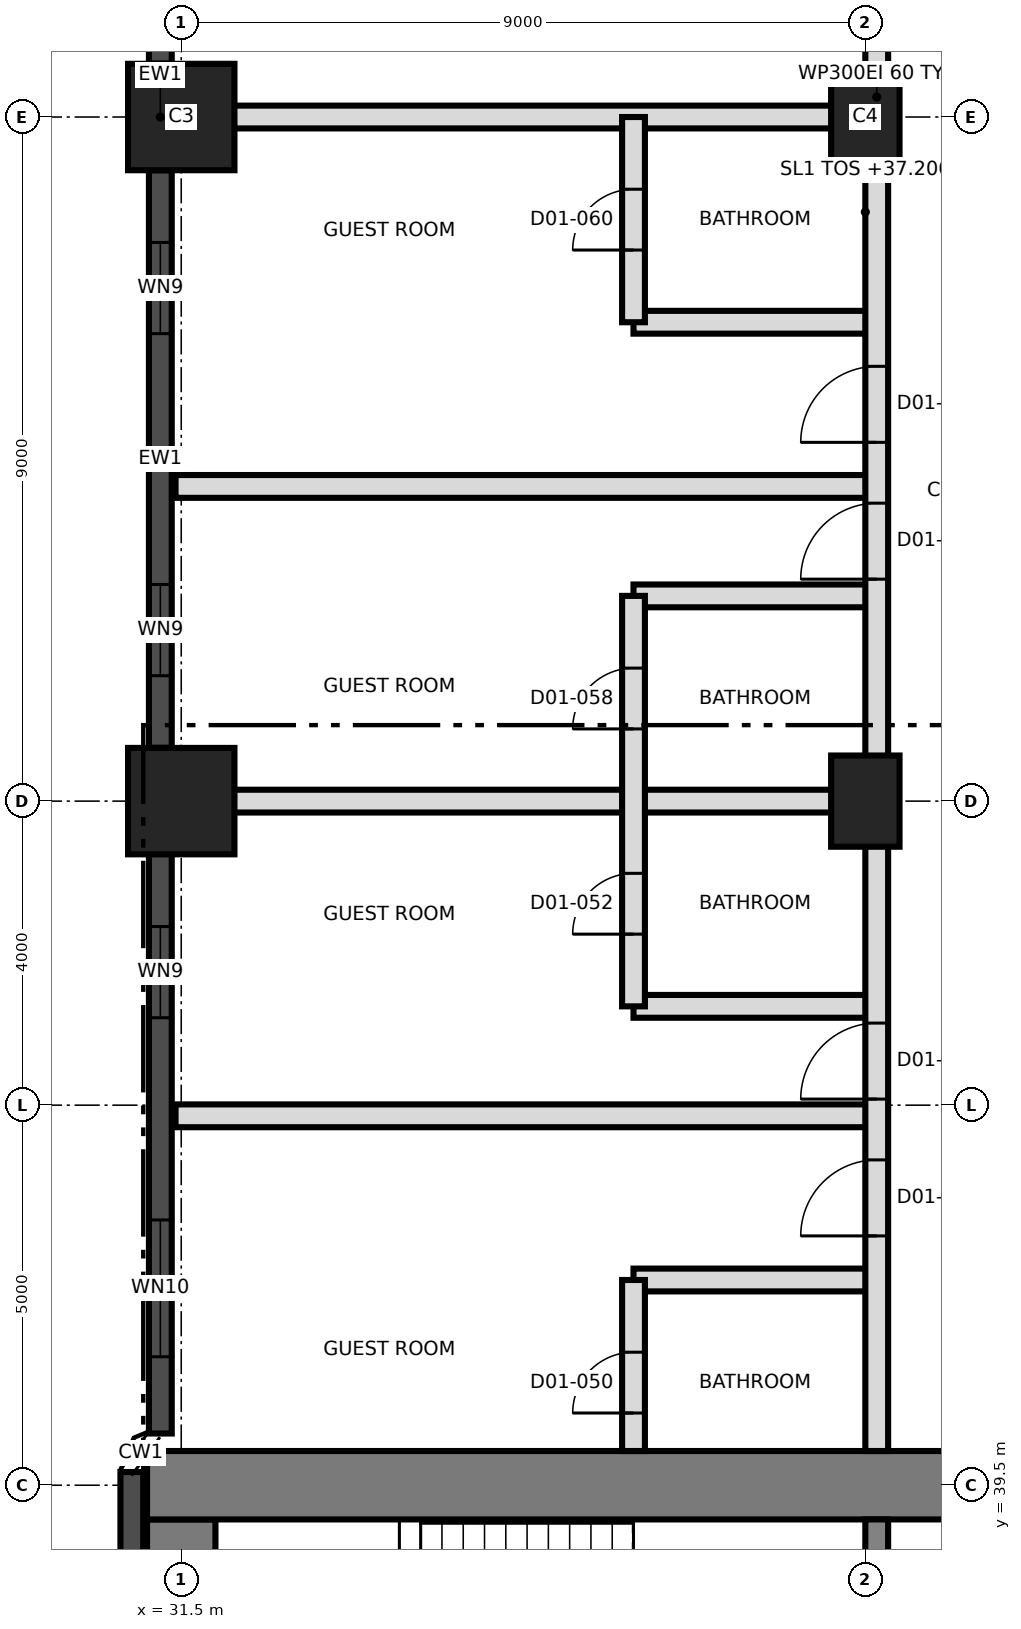
"""IFC4 building model, lengths in metres.
Left out: names, types, materials, properties, quantities, classifications, styles, units other than length and angle.
Written with IfcOpenShell. Run it as: python <this file> out.ifc"""

import sys

from ifc_helpers import new_model, si_unit, direction, frame, frame_2d, origin, origin_2d, place, context, subcontext, project, spatial, rectangle, extrude, element, fill, save


model = new_model("IFC4")
c1 = context("Model", 3, precision=1e-05, world=origin(), true_north=direction((0.0, 1.0)))
c2 = subcontext(c1, "Body", "Model", "MODEL_VIEW")
j1 = project(units=[si_unit("LENGTHUNIT", "METRE"), si_unit("PLANEANGLEUNIT", "RADIAN")], contexts=[c1])
p1 = place(None, origin())
s1 = spatial("IfcSite", under=j1, at=p1, CompositionType="ELEMENT")
p2 = place(p1, origin())
s2 = spatial("IfcBuilding", under=s1, at=p2, CompositionType="ELEMENT")
p3 = place(p2, frame((0.0, 0.0, 37.2)))
s3 = spatial("IfcBuildingStorey", under=s2, at=p3, CompositionType="ELEMENT", Elevation=37.2)
p4 = place(p3, frame((31.5, 21.95, 0.0), z_axis=(0.0, 0.0, 1.0), x_axis=(0.0, 1.0, 0.0)))
e1 = element("IfcWall", 1, at=p4, inside=s3, PredefinedType="SHEAR", context=c2, shape_type="SweptSolid", body=[
    extrude(rectangle(XDim=17.1, YDim=0.9, at=frame_2d((8.55, 0.0))), origin(), (0.0, 0.0, 1.0), 3.7),
])
p5 = place(p3, frame((31.05, 39.5, 0.0), z_axis=(0.0, 0.0, 1.0), x_axis=(1.0, 0.0, 0.0)))
e2 = element("IfcWall", 2, at=p5, inside=s3, PredefinedType="SHEAR", context=c2, shape_type="SweptSolid", body=[
    extrude(rectangle(XDim=27.0, YDim=0.9, at=frame_2d((13.5, 0.0))), origin(), (0.0, 0.0, 1.0), 3.7),
])
p6 = place(p5, frame((10.65, 0.0, 0.0)))
e3 = element("IfcOpeningElement", 3, at=p6, cuts=e2, PredefinedType="OPENING", context=c2, shape_type="SweptSolid", body=[
    extrude(rectangle(XDim=1.2, YDim=2.1, at=frame_2d((0.6, 1.05))), frame((0.0, 0.46, 0.0), z_axis=(0.0, -1.0, 0.0), x_axis=(1.0, 0.0, 0.0)), (0.0, 0.0, 1.0), 0.92),
])
p7 = place(p3, frame((40.65, 33.5, 0.0), z_axis=(0.0, 0.0, 1.0), x_axis=(0.0, 1.0, 0.0)))
e4 = element("IfcWall", 4, at=p7, inside=s3, PredefinedType="SHEAR", context=c2, shape_type="SweptSolid", body=[
    extrude(rectangle(XDim=5.55, YDim=0.3, at=frame_2d((2.775, 0.0))), origin(), (0.0, 0.0, 1.0), 3.7),
])
p8 = place(p3, frame((31.5, 48.5, 0.0), z_axis=(0.0, 0.0, 1.0), x_axis=(1.0, 0.0, 0.0)))
e5 = element("IfcColumn", 5, at=p8, inside=s3, PredefinedType="COLUMN", context=c2, shape_type="SweptSolid", body=[
    extrude(rectangle(XDim=1.4, YDim=1.4, at=origin_2d()), origin(), (0.0, 0.0, 1.0), 3.7),
])
p9 = place(p3, frame((40.5, 48.5, 0.0), z_axis=(0.0, 0.0, 1.0), x_axis=(0.0, 1.0, 0.0)))
e6 = element("IfcColumn", 6, at=p9, inside=s3, PredefinedType="COLUMN", context=c2, shape_type="SweptSolid", body=[
    extrude(rectangle(XDim=1.2, YDim=0.9, at=origin_2d()), origin(), (0.0, 0.0, 1.0), 3.7),
])
p10 = place(p3, frame((31.5, 57.5, 0.0), z_axis=(0.0, 0.0, 1.0), x_axis=(1.0, 0.0, 0.0)))
e7 = element("IfcColumn", 7, at=p10, inside=s3, PredefinedType="COLUMN", context=c2, shape_type="SweptSolid", body=[
    extrude(rectangle(XDim=1.4, YDim=1.4, at=origin_2d()), origin(), (0.0, 0.0, 1.0), 3.7),
])
p11 = place(p3, frame((40.5, 57.5, 0.0), z_axis=(0.0, 0.0, 1.0), x_axis=(0.0, 1.0, 0.0)))
e8 = element("IfcColumn", 8, at=p11, inside=s3, PredefinedType="COLUMN", context=c2, shape_type="SweptSolid", body=[
    extrude(rectangle(XDim=1.2, YDim=0.9, at=origin_2d()), origin(), (0.0, 0.0, 1.0), 3.7),
])
p12 = place(p3, frame((31.225, 65.8, 0.0), z_axis=(0.0, 0.0, 1.0), x_axis=(0.0, -1.0, 0.0)))
e9 = element("IfcWall", 9, at=p12, inside=s3, PredefinedType="SOLIDWALL", context=c2, shape_type="SweptSolid", body=[
    extrude(rectangle(XDim=7.6, YDim=0.3, at=frame_2d((3.8, 0.0))), origin(), (0.0, 0.0, 1.0), 2.7),
])
p13 = place(p12, frame((5.45, 0.0, 0.9)))
e10 = element("IfcOpeningElement", 10, at=p13, cuts=e9, PredefinedType="OPENING", context=c2, shape_type="SweptSolid", body=[
    extrude(rectangle(XDim=1.2, YDim=1.5, at=frame_2d((0.6, 0.75))), frame((0.0, 0.16, 0.0), z_axis=(0.0, -1.0, 0.0), x_axis=(1.0, 0.0, 0.0)), (0.0, 0.0, 1.0), 0.32),
])
p14 = place(p3, frame((31.225, 58.2, 0.0), z_axis=(0.0, 0.0, 1.0), x_axis=(0.0, -1.0, 0.0)))
e11 = element("IfcWall", 11, at=p14, inside=s3, PredefinedType="SOLIDWALL", context=c2, shape_type="SweptSolid", body=[
    extrude(rectangle(XDim=1.4, YDim=0.3, at=frame_2d((0.7, 0.0))), origin(), (0.0, 0.0, 1.0), 3.4),
])
p15 = place(p3, frame((31.225, 56.8, 0.0), z_axis=(0.0, 0.0, 1.0), x_axis=(0.0, -1.0, 0.0)))
e12 = element("IfcWall", 12, at=p15, inside=s3, PredefinedType="SOLIDWALL", context=c2, shape_type="SweptSolid", body=[
    extrude(rectangle(XDim=7.6, YDim=0.3, at=frame_2d((3.8, 0.0))), origin(), (0.0, 0.0, 1.0), 2.7),
])
p16 = place(p15, frame((0.95, 0.0, 0.9)))
e13 = element("IfcOpeningElement", 13, at=p16, cuts=e12, PredefinedType="OPENING", context=c2, shape_type="SweptSolid", body=[
    extrude(rectangle(XDim=1.2, YDim=1.5, at=frame_2d((0.6, 0.75))), frame((0.0, 0.16, 0.0), z_axis=(0.0, -1.0, 0.0), x_axis=(1.0, 0.0, 0.0)), (0.0, 0.0, 1.0), 0.32),
])
p17 = place(p15, frame((5.45, 0.0, 0.9)))
e14 = element("IfcOpeningElement", 14, at=p17, cuts=e12, PredefinedType="OPENING", context=c2, shape_type="SweptSolid", body=[
    extrude(rectangle(XDim=1.2, YDim=1.5, at=frame_2d((0.6, 0.75))), frame((0.0, 0.16, 0.0), z_axis=(0.0, -1.0, 0.0), x_axis=(1.0, 0.0, 0.0)), (0.0, 0.0, 1.0), 0.32),
])
p18 = place(p3, frame((31.225, 49.2, 0.0), z_axis=(0.0, 0.0, 1.0), x_axis=(0.0, -1.0, 0.0)))
e15 = element("IfcWall", 15, at=p18, inside=s3, PredefinedType="SOLIDWALL", context=c2, shape_type="SweptSolid", body=[
    extrude(rectangle(XDim=9.02, YDim=0.3, at=frame_2d((4.51, 0.0))), origin(), (0.0, 0.0, 1.0), 3.4),
])
p19 = place(p18, frame((2.35, 0.0, 0.9)))
e16 = element("IfcOpeningElement", 16, at=p19, cuts=e15, PredefinedType="OPENING", context=c2, shape_type="SweptSolid", body=[
    extrude(rectangle(XDim=1.2, YDim=1.5, at=frame_2d((0.6, 0.75))), frame((0.0, 0.16, 0.0), z_axis=(0.0, -1.0, 0.0), x_axis=(1.0, 0.0, 0.0)), (0.0, 0.0, 1.0), 0.32),
])
p20 = place(p18, frame((6.21, 0.0, 0.3)))
e17 = element("IfcOpeningElement", 17, at=p20, cuts=e15, PredefinedType="OPENING", context=c2, shape_type="SweptSolid", body=[
    extrude(rectangle(XDim=1.8, YDim=2.4, at=frame_2d((0.9, 1.2))), frame((0.0, 0.16, 0.0), z_axis=(0.0, -1.0, 0.0), x_axis=(1.0, 0.0, 0.0)), (0.0, 0.0, 1.0), 0.32),
])
p21 = place(p3, frame((30.85, 39.674, 0.0), z_axis=(0.0, 0.0, 1.0), x_axis=(0.0, -1.0, 0.0)))
e18 = element("IfcWall", 18, at=p21, inside=s3, PredefinedType="SOLIDWALL", context=c2, shape_type="SweptSolid", body=[
    extrude(rectangle(XDim=18.314, YDim=0.3, at=frame_2d((9.157, 0.0))), origin(), (0.0, 0.0, 1.0), 3.4),
])
p22 = place(p3, frame((37.45, 42.2, 0.0), z_axis=(0.0, 0.0, 1.0), x_axis=(1.0, 0.0, 0.0)))
e19 = element("IfcWall", 19, at=p22, inside=s3, PredefinedType="PARTITIONING", context=c2, shape_type="SweptSolid", body=[
    extrude(rectangle(XDim=3.2, YDim=0.3, at=frame_2d((1.6, 0.0))), origin(), (0.0, 0.0, 1.0), 3.4),
])
p23 = place(p3, frame((31.425, 44.36, 0.0), z_axis=(0.0, 0.0, 1.0), x_axis=(1.0, 0.0, 0.0)))
e20 = element("IfcWall", 20, at=p23, inside=s3, PredefinedType="PARTITIONING", context=c2, shape_type="SweptSolid", body=[
    extrude(rectangle(XDim=9.225, YDim=0.3, at=frame_2d((4.612, 0.0))), origin(), (0.0, 0.0, 1.0), 3.4),
])
p24 = place(p3, frame((37.45, 45.8, 0.0), z_axis=(0.0, 0.0, 1.0), x_axis=(1.0, 0.0, 0.0)))
e21 = element("IfcWall", 21, at=p24, inside=s3, PredefinedType="PARTITIONING", context=c2, shape_type="SweptSolid", body=[
    extrude(rectangle(XDim=3.2, YDim=0.3, at=frame_2d((1.6, 0.0))), origin(), (0.0, 0.0, 1.0), 3.4),
])
p25 = place(p3, frame((31.425, 48.5, 0.0), z_axis=(0.0, 0.0, 1.0), x_axis=(1.0, 0.0, 0.0)))
e22 = element("IfcWall", 22, at=p25, inside=s3, PredefinedType="PARTITIONING", context=c2, shape_type="SweptSolid", body=[
    extrude(rectangle(XDim=9.225, YDim=0.3, at=frame_2d((4.612, 0.0))), origin(), (0.0, 0.0, 1.0), 3.4),
])
p26 = place(p3, frame((37.45, 51.2, 0.0), z_axis=(0.0, 0.0, 1.0), x_axis=(1.0, 0.0, 0.0)))
e23 = element("IfcWall", 23, at=p26, inside=s3, PredefinedType="PARTITIONING", context=c2, shape_type="SweptSolid", body=[
    extrude(rectangle(XDim=3.2, YDim=0.3, at=frame_2d((1.6, 0.0))), origin(), (0.0, 0.0, 1.0), 3.4),
])
p27 = place(p3, frame((31.425, 52.64, 0.0), z_axis=(0.0, 0.0, 1.0), x_axis=(1.0, 0.0, 0.0)))
e24 = element("IfcWall", 24, at=p27, inside=s3, PredefinedType="PARTITIONING", context=c2, shape_type="SweptSolid", body=[
    extrude(rectangle(XDim=9.225, YDim=0.3, at=frame_2d((4.612, 0.0))), origin(), (0.0, 0.0, 1.0), 3.4),
])
p28 = place(p3, frame((37.45, 54.8, 0.0), z_axis=(0.0, 0.0, 1.0), x_axis=(1.0, 0.0, 0.0)))
e25 = element("IfcWall", 25, at=p28, inside=s3, PredefinedType="PARTITIONING", context=c2, shape_type="SweptSolid", body=[
    extrude(rectangle(XDim=3.2, YDim=0.3, at=frame_2d((1.6, 0.0))), origin(), (0.0, 0.0, 1.0), 3.4),
])
p29 = place(p3, frame((31.425, 57.5, 0.0), z_axis=(0.0, 0.0, 1.0), x_axis=(1.0, 0.0, 0.0)))
e26 = element("IfcWall", 26, at=p29, inside=s3, PredefinedType="PARTITIONING", context=c2, shape_type="SweptSolid", body=[
    extrude(rectangle(XDim=9.225, YDim=0.3, at=frame_2d((4.612, 0.0))), origin(), (0.0, 0.0, 1.0), 3.4),
])
p30 = place(p3, frame((37.45, 39.95, 0.0), z_axis=(0.0, 0.0, 1.0), x_axis=(0.0, 1.0, 0.0)))
e27 = element("IfcWall", 27, at=p30, inside=s3, PredefinedType="PARTITIONING", context=c2, shape_type="SweptSolid", body=[
    extrude(rectangle(XDim=2.25, YDim=0.3, at=frame_2d((1.125, 0.0))), origin(), (0.0, 0.0, 1.0), 3.4),
])
p31 = place(p30, frame((0.5, 0.0, 0.0)))
e28 = element("IfcOpeningElement", 28, at=p31, cuts=e27, PredefinedType="OPENING", context=c2, shape_type="SweptSolid", body=[
    extrude(rectangle(XDim=0.8, YDim=2.1, at=frame_2d((0.4, 1.05))), frame((0.0, 0.16, 0.0), z_axis=(0.0, -1.0, 0.0), x_axis=(1.0, 0.0, 0.0)), (0.0, 0.0, 1.0), 0.32),
])
p32 = place(p3, frame((37.45, 45.8, 0.0), z_axis=(0.0, 0.0, 1.0), x_axis=(0.0, 1.0, 0.0)))
e29 = element("IfcWall", 29, at=p32, inside=s3, PredefinedType="PARTITIONING", context=c2, shape_type="SweptSolid", body=[
    extrude(rectangle(XDim=5.4, YDim=0.3, at=frame_2d((2.7, 0.0))), origin(), (0.0, 0.0, 1.0), 3.4),
])
p33 = place(p32, frame((0.95, 0.0, 0.0)))
e30 = element("IfcOpeningElement", 30, at=p33, cuts=e29, PredefinedType="OPENING", context=c2, shape_type="SweptSolid", body=[
    extrude(rectangle(XDim=0.8, YDim=2.1, at=frame_2d((0.4, 1.05))), frame((0.0, 0.16, 0.0), z_axis=(0.0, -1.0, 0.0), x_axis=(1.0, 0.0, 0.0)), (0.0, 0.0, 1.0), 0.32),
])
p34 = place(p32, frame((3.65, 0.0, 0.0)))
e31 = element("IfcOpeningElement", 31, at=p34, cuts=e29, PredefinedType="OPENING", context=c2, shape_type="SweptSolid", body=[
    extrude(rectangle(XDim=0.8, YDim=2.1, at=frame_2d((0.4, 1.05))), frame((0.0, 0.16, 0.0), z_axis=(0.0, -1.0, 0.0), x_axis=(1.0, 0.0, 0.0)), (0.0, 0.0, 1.0), 0.32),
])
p35 = place(p3, frame((37.45, 54.8, 0.0), z_axis=(0.0, 0.0, 1.0), x_axis=(0.0, 1.0, 0.0)))
e32 = element("IfcWall", 32, at=p35, inside=s3, PredefinedType="PARTITIONING", context=c2, shape_type="SweptSolid", body=[
    extrude(rectangle(XDim=2.7, YDim=0.3, at=frame_2d((1.35, 0.0))), origin(), (0.0, 0.0, 1.0), 3.4),
])
p36 = place(p35, frame((0.95, 0.0, 0.0)))
e33 = element("IfcOpeningElement", 33, at=p36, cuts=e32, PredefinedType="OPENING", context=c2, shape_type="SweptSolid", body=[
    extrude(rectangle(XDim=0.8, YDim=2.1, at=frame_2d((0.4, 1.05))), frame((0.0, 0.16, 0.0), z_axis=(0.0, -1.0, 0.0), x_axis=(1.0, 0.0, 0.0)), (0.0, 0.0, 1.0), 0.32),
])
p37 = place(p3, frame((40.65, 39.95, 0.0), z_axis=(0.0, 0.0, 1.0), x_axis=(0.0, 1.0, 0.0)))
e34 = element("IfcWall", 34, at=p37, inside=s3, PredefinedType="PARTITIONING", context=c2, shape_type="SweptSolid", body=[
    extrude(rectangle(XDim=35.625, YDim=0.3, at=frame_2d((17.812, 0.0))), origin(), (0.0, 0.0, 1.0), 3.4),
])
p38 = place(p37, frame((2.83, 0.0, 0.0)))
e35 = element("IfcOpeningElement", 35, at=p38, cuts=e34, PredefinedType="OPENING", context=c2, shape_type="SweptSolid", body=[
    extrude(rectangle(XDim=1.0, YDim=2.1, at=frame_2d((0.5, 1.05))), frame((0.0, 0.16, 0.0), z_axis=(0.0, -1.0, 0.0), x_axis=(1.0, 0.0, 0.0)), (0.0, 0.0, 1.0), 0.32),
])
p39 = place(p37, frame((4.63, 0.0, 0.0)))
e36 = element("IfcOpeningElement", 36, at=p39, cuts=e34, PredefinedType="OPENING", context=c2, shape_type="SweptSolid", body=[
    extrude(rectangle(XDim=1.0, YDim=2.1, at=frame_2d((0.5, 1.05))), frame((0.0, 0.16, 0.0), z_axis=(0.0, -1.0, 0.0), x_axis=(1.0, 0.0, 0.0)), (0.0, 0.0, 1.0), 0.32),
])
p40 = place(p37, frame((11.47, 0.0, 0.0)))
e37 = element("IfcOpeningElement", 37, at=p40, cuts=e34, PredefinedType="OPENING", context=c2, shape_type="SweptSolid", body=[
    extrude(rectangle(XDim=1.0, YDim=2.1, at=frame_2d((0.5, 1.05))), frame((0.0, 0.16, 0.0), z_axis=(0.0, -1.0, 0.0), x_axis=(1.0, 0.0, 0.0)), (0.0, 0.0, 1.0), 0.32),
])
p41 = place(p37, frame((13.27, 0.0, 0.0)))
e38 = element("IfcOpeningElement", 38, at=p41, cuts=e34, PredefinedType="OPENING", context=c2, shape_type="SweptSolid", body=[
    extrude(rectangle(XDim=1.0, YDim=2.1, at=frame_2d((0.5, 1.05))), frame((0.0, 0.16, 0.0), z_axis=(0.0, -1.0, 0.0), x_axis=(1.0, 0.0, 0.0)), (0.0, 0.0, 1.0), 0.32),
])
p42 = place(p37, frame((21.05, 0.0, 0.0)))
e39 = element("IfcOpeningElement", 39, at=p42, cuts=e34, PredefinedType="OPENING", context=c2, shape_type="SweptSolid", body=[
    extrude(rectangle(XDim=1.0, YDim=2.4, at=frame_2d((0.5, 1.2))), frame((0.0, 0.16, 0.0), z_axis=(0.0, -1.0, 0.0), x_axis=(1.0, 0.0, 0.0)), (0.0, 0.0, 1.0), 0.32),
])
p43 = place(p16, origin())
e40 = element("IfcWindow", 40, at=p43, inside=s3, PartitioningType="SINGLE_PANEL", PredefinedType="WINDOW", context=c2, shape_type="SweptSolid", body=[
    extrude(rectangle(XDim=1.2, YDim=1.5, at=frame_2d((0.6, 0.75))), frame((0.0, 0.03, 0.0), z_axis=(0.0, -1.0, 0.0), x_axis=(1.0, 0.0, 0.0)), (0.0, 0.0, 1.0), 0.06),
])
fill(e13, e40)
p44 = place(p17, origin())
e41 = element("IfcWindow", 41, at=p44, inside=s3, PartitioningType="SINGLE_PANEL", PredefinedType="WINDOW", context=c2, shape_type="SweptSolid", body=[
    extrude(rectangle(XDim=1.2, YDim=1.5, at=frame_2d((0.6, 0.75))), frame((0.0, 0.03, 0.0), z_axis=(0.0, -1.0, 0.0), x_axis=(1.0, 0.0, 0.0)), (0.0, 0.0, 1.0), 0.06),
])
fill(e14, e41)
p45 = place(p19, origin())
e42 = element("IfcWindow", 42, at=p45, inside=s3, PartitioningType="SINGLE_PANEL", PredefinedType="WINDOW", context=c2, shape_type="SweptSolid", body=[
    extrude(rectangle(XDim=1.2, YDim=1.5, at=frame_2d((0.6, 0.75))), frame((0.0, 0.03, 0.0), z_axis=(0.0, -1.0, 0.0), x_axis=(1.0, 0.0, 0.0)), (0.0, 0.0, 1.0), 0.06),
])
fill(e16, e42)
p46 = place(p20, origin())
e43 = element("IfcWindow", 43, at=p46, inside=s3, PartitioningType="SINGLE_PANEL", PredefinedType="WINDOW", context=c2, shape_type="SweptSolid", body=[
    extrude(rectangle(XDim=1.8, YDim=2.4, at=frame_2d((0.9, 1.2))), frame((0.0, 0.03, 0.0), z_axis=(0.0, -1.0, 0.0), x_axis=(1.0, 0.0, 0.0)), (0.0, 0.0, 1.0), 0.06),
])
fill(e17, e43)
p47 = place(p31, origin())
e44 = element("IfcDoor", 44, at=p47, inside=s3, OperationType="SINGLE_SWING_LEFT", PredefinedType="DOOR", context=c2, shape_type="SweptSolid", body=[
    extrude(rectangle(XDim=0.8, YDim=2.1, at=frame_2d((0.4, 1.05))), frame((0.0, 0.025, 0.0), z_axis=(0.0, -1.0, 0.0), x_axis=(1.0, 0.0, 0.0)), (0.0, 0.0, 1.0), 0.05),
])
fill(e28, e44)
p48 = place(p38, origin())
e45 = element("IfcDoor", 45, at=p48, inside=s3, OperationType="SINGLE_SWING_RIGHT", PredefinedType="DOOR", context=c2, shape_type="SweptSolid", body=[
    extrude(rectangle(XDim=1.0, YDim=2.1, at=frame_2d((0.5, 1.05))), frame((0.0, 0.025, 0.0), z_axis=(0.0, -1.0, 0.0), x_axis=(1.0, 0.0, 0.0)), (0.0, 0.0, 1.0), 0.05),
])
fill(e35, e45)
p49 = place(p33, origin())
e46 = element("IfcDoor", 46, at=p49, inside=s3, OperationType="SINGLE_SWING_RIGHT", PredefinedType="DOOR", context=c2, shape_type="SweptSolid", body=[
    extrude(rectangle(XDim=0.8, YDim=2.1, at=frame_2d((0.4, 1.05))), frame((0.0, 0.025, 0.0), z_axis=(0.0, -1.0, 0.0), x_axis=(1.0, 0.0, 0.0)), (0.0, 0.0, 1.0), 0.05),
])
fill(e30, e46)
p50 = place(p39, origin())
e47 = element("IfcDoor", 47, at=p50, inside=s3, OperationType="SINGLE_SWING_LEFT", PredefinedType="DOOR", context=c2, shape_type="SweptSolid", body=[
    extrude(rectangle(XDim=1.0, YDim=2.1, at=frame_2d((0.5, 1.05))), frame((0.0, 0.025, 0.0), z_axis=(0.0, -1.0, 0.0), x_axis=(1.0, 0.0, 0.0)), (0.0, 0.0, 1.0), 0.05),
])
fill(e36, e47)
p51 = place(p34, origin())
e48 = element("IfcDoor", 48, at=p51, inside=s3, OperationType="SINGLE_SWING_RIGHT", PredefinedType="DOOR", context=c2, shape_type="SweptSolid", body=[
    extrude(rectangle(XDim=0.8, YDim=2.1, at=frame_2d((0.4, 1.05))), frame((0.0, 0.025, 0.0), z_axis=(0.0, -1.0, 0.0), x_axis=(1.0, 0.0, 0.0)), (0.0, 0.0, 1.0), 0.05),
])
fill(e31, e48)
p52 = place(p40, origin())
e49 = element("IfcDoor", 49, at=p52, inside=s3, OperationType="SINGLE_SWING_LEFT", PredefinedType="DOOR", context=c2, shape_type="SweptSolid", body=[
    extrude(rectangle(XDim=1.0, YDim=2.1, at=frame_2d((0.5, 1.05))), frame((0.0, 0.025, 0.0), z_axis=(0.0, -1.0, 0.0), x_axis=(1.0, 0.0, 0.0)), (0.0, 0.0, 1.0), 0.05),
])
fill(e37, e49)
p53 = place(p36, origin())
e50 = element("IfcDoor", 50, at=p53, inside=s3, OperationType="SINGLE_SWING_LEFT", PredefinedType="DOOR", context=c2, shape_type="SweptSolid", body=[
    extrude(rectangle(XDim=0.8, YDim=2.1, at=frame_2d((0.4, 1.05))), frame((0.0, 0.025, 0.0), z_axis=(0.0, -1.0, 0.0), x_axis=(1.0, 0.0, 0.0)), (0.0, 0.0, 1.0), 0.05),
])
fill(e33, e50)
p54 = place(p41, origin())
e51 = element("IfcDoor", 51, at=p54, inside=s3, OperationType="SINGLE_SWING_LEFT", PredefinedType="DOOR", context=c2, shape_type="SweptSolid", body=[
    extrude(rectangle(XDim=1.0, YDim=2.1, at=frame_2d((0.5, 1.05))), frame((0.0, 0.025, 0.0), z_axis=(0.0, -1.0, 0.0), x_axis=(1.0, 0.0, 0.0)), (0.0, 0.0, 1.0), 0.05),
])
fill(e38, e51)
save(model, sys.argv[1])
